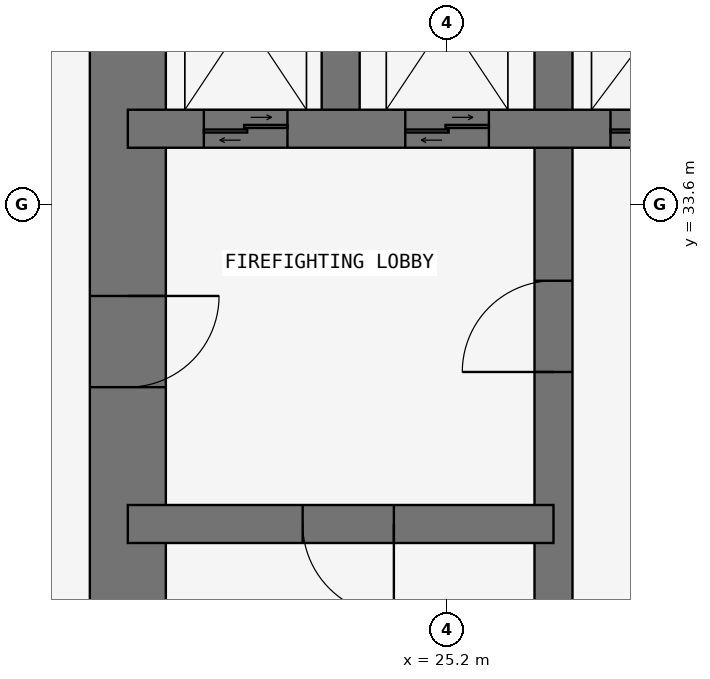
"""IFC4 building model, lengths in metres.
Left out: names, types, materials, properties, quantities, classifications, styles, units other than length and angle.
Written with IfcOpenShell. Run it as: python <this file> out.ifc"""

import sys

from ifc_helpers import new_model, si_unit, direction, frame, frame_2d, origin, place, context, subcontext, project, spatial, rectangle, extrude, element, fill, save


model = new_model("IFC4")
c1 = context("Model", 3, precision=1e-05, world=origin(), true_north=direction((0.0, 1.0)))
c2 = subcontext(c1, "Body", "Model", "MODEL_VIEW")
j1 = project(units=[si_unit("LENGTHUNIT", "METRE"), si_unit("PLANEANGLEUNIT", "RADIAN")], contexts=[c1])
p1 = place(None, origin())
s1 = spatial("IfcSite", under=j1, at=p1, CompositionType="ELEMENT")
p2 = place(p1, origin())
s2 = spatial("IfcBuilding", under=s1, at=p2, CompositionType="ELEMENT")
p3 = place(p2, frame((0.0, 0.0, 88.5)))
s3 = spatial("IfcBuildingStorey", under=s2, at=p3, CompositionType="ELEMENT", Elevation=88.5)
p4 = place(p3, frame((21.0, 37.8, 0.0), z_axis=(0.0, 0.0, 1.0), x_axis=(0.0, -1.0, 0.0)))
e1 = element("IfcWall", 1, at=p4, inside=s3, PredefinedType="SHEAR", context=c2, shape_type="SweptSolid", body=[
    extrude(rectangle(XDim=17.3, YDim=1.0, at=frame_2d((8.65, 0.0))), origin(), (0.0, 0.0, 1.0), 3.6),
])
p5 = place(p4, frame((5.4, 0.0, 0.0)))
e2 = element("IfcOpeningElement", 2, at=p5, cuts=e1, PredefinedType="OPENING", context=c2, shape_type="SweptSolid", body=[
    extrude(rectangle(XDim=1.2, YDim=2.1, at=frame_2d((0.6, 1.05))), frame((0.0, 0.51, 0.0), z_axis=(0.0, -1.0, 0.0), x_axis=(1.0, 0.0, 0.0)), (0.0, 0.0, 1.0), 1.02),
])
p6 = place(p3, frame((26.6, 21.0, 0.0), z_axis=(0.0, 0.0, 1.0), x_axis=(0.0, 1.0, 0.0)))
e3 = element("IfcWall", 3, at=p6, inside=s3, PredefinedType="SHEAR", context=c2, shape_type="SweptSolid", body=[
    extrude(rectangle(XDim=16.8, YDim=0.5, at=frame_2d((8.4, 0.0))), origin(), (0.0, 0.0, 1.0), 3.6),
])
p7 = place(p6, frame((10.4, 0.0, 0.0)))
e4 = element("IfcOpeningElement", 4, at=p7, cuts=e3, PredefinedType="OPENING", context=c2, shape_type="SweptSolid", body=[
    extrude(rectangle(XDim=1.2, YDim=2.1, at=frame_2d((0.6, 1.05))), frame((0.0, 0.26, 0.0), z_axis=(0.0, -1.0, 0.0), x_axis=(1.0, 0.0, 0.0)), (0.0, 0.0, 1.0), 0.52),
])
p8 = place(p3, frame((21.0, 29.4, 0.0), z_axis=(0.0, 0.0, 1.0), x_axis=(1.0, 0.0, 0.0)))
e5 = element("IfcWall", 5, at=p8, inside=s3, PredefinedType="SHEAR", context=c2, shape_type="SweptSolid", body=[
    extrude(rectangle(XDim=5.6, YDim=0.5, at=frame_2d((2.8, 0.0))), origin(), (0.0, 0.0, 1.0), 3.6),
])
p9 = place(p8, frame((2.3, 0.0, 0.0)))
e6 = element("IfcOpeningElement", 6, at=p9, cuts=e5, PredefinedType="OPENING", context=c2, shape_type="SweptSolid", body=[
    extrude(rectangle(XDim=1.2, YDim=2.1, at=frame_2d((0.6, 1.05))), frame((0.0, 0.26, 0.0), z_axis=(0.0, -1.0, 0.0), x_axis=(1.0, 0.0, 0.0)), (0.0, 0.0, 1.0), 0.52),
])
p10 = place(p3, frame((21.0, 34.6, 0.0), z_axis=(0.0, 0.0, 1.0), x_axis=(1.0, 0.0, 0.0)))
e7 = element("IfcWall", 7, at=p10, inside=s3, PredefinedType="SHEAR", context=c2, shape_type="SweptSolid", body=[
    extrude(rectangle(XDim=11.2, YDim=0.5, at=frame_2d((5.6, 0.0))), origin(), (0.0, 0.0, 1.0), 3.6),
])
p11 = place(p10, frame((9.35, 0.0, 0.0)))
e8 = element("IfcOpeningElement", 8, at=p11, cuts=e7, PredefinedType="OPENING", context=c2, shape_type="SweptSolid", body=[
    extrude(rectangle(XDim=0.9, YDim=2.1, at=frame_2d((0.45, 1.05))), frame((0.0, 0.26, 0.0), z_axis=(0.0, -1.0, 0.0), x_axis=(1.0, 0.0, 0.0)), (0.0, 0.0, 1.0), 0.52),
])
p12 = place(p10, frame((1.0, 0.0, 0.0)))
e9 = element("IfcOpeningElement", 9, at=p12, cuts=e7, PredefinedType="OPENING", context=c2, shape_type="SweptSolid", body=[
    extrude(rectangle(XDim=1.1, YDim=2.1, at=frame_2d((0.55, 1.05))), frame((0.0, 0.26, 0.0), z_axis=(0.0, -1.0, 0.0), x_axis=(1.0, 0.0, 0.0)), (0.0, 0.0, 1.0), 0.52),
])
p13 = place(p10, frame((3.65, 0.0, 0.0)))
e10 = element("IfcOpeningElement", 10, at=p13, cuts=e7, PredefinedType="OPENING", context=c2, shape_type="SweptSolid", body=[
    extrude(rectangle(XDim=1.1, YDim=2.1, at=frame_2d((0.55, 1.05))), frame((0.0, 0.26, 0.0), z_axis=(0.0, -1.0, 0.0), x_axis=(1.0, 0.0, 0.0)), (0.0, 0.0, 1.0), 0.52),
])
p14 = place(p10, frame((6.35, 0.0, 0.0)))
e11 = element("IfcOpeningElement", 11, at=p14, cuts=e7, PredefinedType="OPENING", context=c2, shape_type="SweptSolid", body=[
    extrude(rectangle(XDim=1.3, YDim=2.1, at=frame_2d((0.65, 1.05))), frame((0.0, 0.26, 0.0), z_axis=(0.0, -1.0, 0.0), x_axis=(1.0, 0.0, 0.0)), (0.0, 0.0, 1.0), 0.52),
])
p15 = place(p3, frame((23.8, 34.6, 0.0), z_axis=(0.0, 0.0, 1.0), x_axis=(0.0, 1.0, 0.0)))
e12 = element("IfcWall", 12, at=p15, inside=s3, PredefinedType="SHEAR", context=c2, shape_type="SweptSolid", body=[
    extrude(rectangle(XDim=3.2, YDim=0.5, at=frame_2d((1.6, 0.0))), origin(), (0.0, 0.0, 1.0), 3.6),
])
p16 = place(p5, origin())
e13 = element("IfcDoor", 13, at=p16, inside=s3, OperationType="SINGLE_SWING_LEFT", PredefinedType="DOOR", context=c2, shape_type="SweptSolid", body=[
    extrude(rectangle(XDim=1.2, YDim=2.1, at=frame_2d((0.6, 1.05))), frame((0.0, 0.025, 0.0), z_axis=(0.0, -1.0, 0.0), x_axis=(1.0, 0.0, 0.0)), (0.0, 0.0, 1.0), 0.05),
])
fill(e2, e13)
p17 = place(p9, frame((1.2, 0.0, 0.0), z_axis=(0.0, 0.0, 1.0), x_axis=(-1.0, 0.0, 0.0)))
e14 = element("IfcDoor", 14, at=p17, inside=s3, OperationType="SINGLE_SWING_LEFT", PredefinedType="DOOR", context=c2, shape_type="SweptSolid", body=[
    extrude(rectangle(XDim=1.2, YDim=2.1, at=frame_2d((0.6, 1.05))), frame((0.0, 0.025, 0.0), z_axis=(0.0, -1.0, 0.0), x_axis=(1.0, 0.0, 0.0)), (0.0, 0.0, 1.0), 0.05),
])
fill(e6, e14)
p18 = place(p7, origin())
e15 = element("IfcDoor", 15, at=p18, inside=s3, OperationType="SINGLE_SWING_LEFT", PredefinedType="DOOR", context=c2, shape_type="SweptSolid", body=[
    extrude(rectangle(XDim=1.2, YDim=2.1, at=frame_2d((0.6, 1.05))), frame((0.0, 0.025, 0.0), z_axis=(0.0, -1.0, 0.0), x_axis=(1.0, 0.0, 0.0)), (0.0, 0.0, 1.0), 0.05),
])
fill(e4, e15)
p19 = place(p12, origin())
e16 = element("IfcDoor", 16, at=p19, inside=s3, OperationType="DOUBLE_DOOR_SLIDING", PredefinedType="DOOR", context=c2, shape_type="SweptSolid", body=[
    extrude(rectangle(XDim=1.1, YDim=2.1, at=frame_2d((0.55, 1.05))), frame((0.0, 0.025, 0.0), z_axis=(0.0, -1.0, 0.0), x_axis=(1.0, 0.0, 0.0)), (0.0, 0.0, 1.0), 0.05),
])
fill(e9, e16)
p20 = place(p13, origin())
e17 = element("IfcDoor", 17, at=p20, inside=s3, OperationType="DOUBLE_DOOR_SLIDING", PredefinedType="DOOR", context=c2, shape_type="SweptSolid", body=[
    extrude(rectangle(XDim=1.1, YDim=2.1, at=frame_2d((0.55, 1.05))), frame((0.0, 0.025, 0.0), z_axis=(0.0, -1.0, 0.0), x_axis=(1.0, 0.0, 0.0)), (0.0, 0.0, 1.0), 0.05),
])
fill(e10, e17)
p21 = place(p14, origin())
e18 = element("IfcDoor", 18, at=p21, inside=s3, OperationType="DOUBLE_DOOR_SLIDING", PredefinedType="DOOR", context=c2, shape_type="SweptSolid", body=[
    extrude(rectangle(XDim=1.3, YDim=2.1, at=frame_2d((0.65, 1.05))), frame((0.0, 0.025, 0.0), z_axis=(0.0, -1.0, 0.0), x_axis=(1.0, 0.0, 0.0)), (0.0, 0.0, 1.0), 0.05),
])
fill(e11, e18)
save(model, sys.argv[1])
